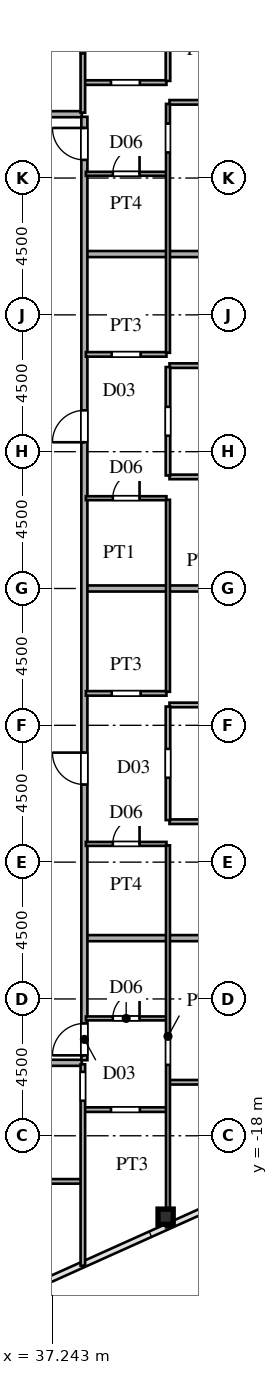
"""IFC4 building model, lengths in metres.
Left out: names, types, materials, properties, quantities, classifications, styles, units other than length and angle.
Written with IfcOpenShell. Run it as: python <this file> out.ifc"""

import sys

from ifc_helpers import new_model, si_unit, direction, frame, frame_2d, origin, origin_2d, place, context, subcontext, project, spatial, rectangle, hollow_rectangle, extrude, source, transform, mapped, element, fill, save


model = new_model("IFC4")
c1 = context("Model", 3, precision=1e-05, world=origin(), true_north=direction((0.0, 1.0)))
c2 = subcontext(c1, "Body", "Model", "MODEL_VIEW")
j1 = project(units=[si_unit("LENGTHUNIT", "METRE"), si_unit("PLANEANGLEUNIT", "RADIAN")], contexts=[c1])
p1 = place(None, origin())
s1 = spatial("IfcSite", under=j1, at=p1, CompositionType="ELEMENT")
p2 = place(p1, origin())
s2 = spatial("IfcBuilding", under=s1, at=p2, CompositionType="ELEMENT")
p3 = place(p2, frame((0.0, 0.0, 83.7)))
s3 = spatial("IfcBuildingStorey", under=s2, at=p3, CompositionType="ELEMENT", Elevation=83.7)
m1 = source(origin(), c2, "Body", "SweptSolid", [
    extrude(hollow_rectangle(XDim=0.5, YDim=0.5, WallThickness=0.02, at=origin_2d()), origin(), (0.0, 0.0, 1.0), 3.6),
])
p4 = place(p3, frame((40.973, -20.661, 0.0), z_axis=(0.0, 0.0, 1.0), x_axis=(1.0, 0.0, 0.0)))
e1 = element("IfcColumn", 1, at=p4, inside=s3, PredefinedType="COLUMN", context=c2, shape_type="MappedRepresentation", body=[
    mapped(m1, transform((0.0, 0.0, 0.0), scale=1.0)),
])
p5 = place(p3, frame((27.465, -19.5, 0.0), z_axis=(0.0, 0.0, 1.0), x_axis=(1.0, 0.0, 0.0)))
e2 = element("IfcWall", 2, at=p5, inside=s3, PredefinedType="PARTITIONING", context=c2, shape_type="SweptSolid", body=[
    extrude(rectangle(XDim=10.735, YDim=0.15, at=frame_2d((5.367, 0.0))), origin(), (0.0, 0.0, 1.0), 3.34),
])
p6 = place(p5, frame((4.935, 0.0, 0.0)))
e3 = element("IfcOpeningElement", 3, at=p6, cuts=e2, PredefinedType="OPENING", context=c2, shape_type="SweptSolid", body=[
    extrude(rectangle(XDim=0.95, YDim=2.15, at=frame_2d((0.475, 1.075))), frame((0.0, 0.085, 0.0), z_axis=(0.0, -1.0, 0.0), x_axis=(1.0, 0.0, 0.0)), (0.0, 0.0, 1.0), 0.17),
])
p7 = place(p3, frame((38.3, -17.14, 0.0), z_axis=(0.0, 0.0, 1.0), x_axis=(1.0, 0.0, 0.0)))
e4 = element("IfcWall", 4, at=p7, inside=s3, PredefinedType="PARTITIONING", context=c2, shape_type="SweptSolid", body=[
    extrude(rectangle(XDim=2.7, YDim=0.15, at=frame_2d((1.35, 0.0))), origin(), (0.0, 0.0, 1.0), 3.34),
])
p8 = place(p7, frame((0.875, 0.0, 0.0)))
e5 = element("IfcOpeningElement", 5, at=p8, cuts=e4, PredefinedType="OPENING", context=c2, shape_type="SweptSolid", body=[
    extrude(rectangle(XDim=0.95, YDim=2.15, at=frame_2d((0.475, 1.075))), frame((0.0, 0.085, 0.0), z_axis=(0.0, -1.0, 0.0), x_axis=(1.0, 0.0, 0.0)), (0.0, 0.0, 1.0), 0.17),
])
p9 = place(p3, frame((41.1, -16.24, 0.0), z_axis=(0.0, 0.0, 1.0), x_axis=(1.0, 0.0, 0.0)))
e6 = element("IfcWall", 6, at=p9, inside=s3, PredefinedType="PARTITIONING", context=c2, shape_type="SweptSolid", body=[
    extrude(rectangle(XDim=10.515, YDim=0.15, at=frame_2d((5.257, 0.0))), origin(), (0.0, 0.0, 1.0), 3.34),
])
p10 = place(p9, frame((2.837, 0.0, 0.0)))
e7 = element("IfcOpeningElement", 7, at=p10, cuts=e6, PredefinedType="OPENING", context=c2, shape_type="SweptSolid", body=[
    extrude(rectangle(XDim=0.95, YDim=2.15, at=frame_2d((0.475, 1.075))), frame((0.0, 0.085, 0.0), z_axis=(0.0, -1.0, 0.0), x_axis=(1.0, 0.0, 0.0)), (0.0, 0.0, 1.0), 0.17),
])
p11 = place(p3, frame((36.585, -15.6, 0.0), z_axis=(0.0, 0.0, 1.0), x_axis=(1.0, 0.0, 0.0)))
e8 = element("IfcWall", 8, at=p11, inside=s3, PredefinedType="PARTITIONING", context=c2, shape_type="SweptSolid", body=[
    extrude(rectangle(XDim=1.63, YDim=0.2, at=frame_2d((0.815, 0.0))), origin(), (0.0, 0.0, 1.0), 3.34),
])
p12 = place(p3, frame((38.35, -14.14, 0.0), z_axis=(0.0, 0.0, 1.0), x_axis=(1.0, 0.0, 0.0)))
e9 = element("IfcWall", 9, at=p12, inside=s3, PredefinedType="PARTITIONING", context=c2, shape_type="SweptSolid", body=[
    extrude(rectangle(XDim=2.65, YDim=0.13, at=frame_2d((1.325, 0.0))), origin(), (0.0, 0.0, 1.0), 3.34),
])
p13 = place(p12, frame((0.885, 0.0, 0.0)))
e10 = element("IfcOpeningElement", 10, at=p13, cuts=e9, PredefinedType="OPENING", context=c2, shape_type="SweptSolid", body=[
    extrude(rectangle(XDim=0.88, YDim=2.1, at=frame_2d((0.44, 1.05))), frame((0.0, 0.075, 0.0), z_axis=(0.0, -1.0, 0.0), x_axis=(1.0, 0.0, 0.0)), (0.0, 0.0, 1.0), 0.15),
])
p14 = place(p3, frame((38.38, -11.5, 0.0), z_axis=(0.0, 0.0, 1.0), x_axis=(1.0, 0.0, 0.0)))
e11 = element("IfcWall", 11, at=p14, inside=s3, PredefinedType="PARTITIONING", context=c2, shape_type="SweptSolid", body=[
    extrude(rectangle(XDim=23.743, YDim=0.2, at=frame_2d((11.872, 0.0))), origin(), (0.0, 0.0, 1.0), 3.34),
])
p15 = place(p3, frame((38.35, -8.4, 0.0), z_axis=(0.0, 0.0, 1.0), x_axis=(1.0, 0.0, 0.0)))
e12 = element("IfcWall", 12, at=p15, inside=s3, PredefinedType="PARTITIONING", context=c2, shape_type="SweptSolid", body=[
    extrude(rectangle(XDim=2.65, YDim=0.13, at=frame_2d((1.325, 0.0))), origin(), (0.0, 0.0, 1.0), 3.34),
])
p16 = place(p15, frame((0.885, 0.0, 0.0)))
e13 = element("IfcOpeningElement", 13, at=p16, cuts=e12, PredefinedType="OPENING", context=c2, shape_type="SweptSolid", body=[
    extrude(rectangle(XDim=0.88, YDim=2.1, at=frame_2d((0.44, 1.05))), frame((0.0, 0.075, 0.0), z_axis=(0.0, -1.0, 0.0), x_axis=(1.0, 0.0, 0.0)), (0.0, 0.0, 1.0), 0.15),
])
p17 = place(p3, frame((41.1, -7.67, 0.0), z_axis=(0.0, 0.0, 1.0), x_axis=(1.0, 0.0, 0.0)))
e14 = element("IfcWall", 14, at=p17, inside=s3, PredefinedType="PARTITIONING", context=c2, shape_type="SweptSolid", body=[
    extrude(rectangle(XDim=29.218, YDim=0.15, at=frame_2d((14.609, 0.0))), origin(), (0.0, 0.0, 1.0), 3.34),
])
p18 = place(p17, frame((6.2, 0.0, 0.0)))
e15 = element("IfcOpeningElement", 15, at=p18, cuts=e14, PredefinedType="OPENING", context=c2, shape_type="SweptSolid", body=[
    extrude(rectangle(XDim=0.95, YDim=2.15, at=frame_2d((0.475, 1.075))), frame((0.0, 0.085, 0.0), z_axis=(0.0, -1.0, 0.0), x_axis=(1.0, 0.0, 0.0)), (0.0, 0.0, 1.0), 0.17),
])
p19 = place(p17, frame((15.775, 0.0, 0.0)))
e16 = element("IfcOpeningElement", 16, at=p19, cuts=e14, PredefinedType="OPENING", context=c2, shape_type="SweptSolid", body=[
    extrude(rectangle(XDim=0.95, YDim=2.15, at=frame_2d((0.475, 1.075))), frame((0.0, 0.085, 0.0), z_axis=(0.0, -1.0, 0.0), x_axis=(1.0, 0.0, 0.0)), (0.0, 0.0, 1.0), 0.17),
])
p20 = place(p3, frame((41.1, -3.83, 0.0), z_axis=(0.0, 0.0, 1.0), x_axis=(1.0, 0.0, 0.0)))
e17 = element("IfcWall", 17, at=p20, inside=s3, PredefinedType="PARTITIONING", context=c2, shape_type="SweptSolid", body=[
    extrude(rectangle(XDim=29.935, YDim=0.15, at=frame_2d((14.967, 0.0))), origin(), (0.0, 0.0, 1.0), 3.34),
])
p21 = place(p20, frame((6.2, 0.0, 0.0)))
e18 = element("IfcOpeningElement", 18, at=p21, cuts=e17, PredefinedType="OPENING", context=c2, shape_type="SweptSolid", body=[
    extrude(rectangle(XDim=0.95, YDim=2.15, at=frame_2d((0.475, 1.075))), frame((0.0, 0.085, 0.0), z_axis=(0.0, -1.0, 0.0), x_axis=(1.0, 0.0, 0.0)), (0.0, 0.0, 1.0), 0.17),
])
p22 = place(p20, frame((15.775, 0.0, 0.0)))
e19 = element("IfcOpeningElement", 19, at=p22, cuts=e17, PredefinedType="OPENING", context=c2, shape_type="SweptSolid", body=[
    extrude(rectangle(XDim=0.95, YDim=2.15, at=frame_2d((0.475, 1.075))), frame((0.0, 0.085, 0.0), z_axis=(0.0, -1.0, 0.0), x_axis=(1.0, 0.0, 0.0)), (0.0, 0.0, 1.0), 0.17),
])
p23 = place(p3, frame((38.35, -3.45, 0.0), z_axis=(0.0, 0.0, 1.0), x_axis=(1.0, 0.0, 0.0)))
e20 = element("IfcWall", 20, at=p23, inside=s3, PredefinedType="PARTITIONING", context=c2, shape_type="SweptSolid", body=[
    extrude(rectangle(XDim=2.65, YDim=0.15, at=frame_2d((1.325, 0.0))), origin(), (0.0, 0.0, 1.0), 3.34),
])
p24 = place(p23, frame((0.85, 0.0, 0.0)))
e21 = element("IfcOpeningElement", 21, at=p24, cuts=e20, PredefinedType="OPENING", context=c2, shape_type="SweptSolid", body=[
    extrude(rectangle(XDim=0.95, YDim=2.15, at=frame_2d((0.475, 1.075))), frame((0.0, 0.085, 0.0), z_axis=(0.0, -1.0, 0.0), x_axis=(1.0, 0.0, 0.0)), (0.0, 0.0, 1.0), 0.17),
])
p25 = place(p3, frame((38.38, 0.0, 0.0), z_axis=(0.0, 0.0, 1.0), x_axis=(1.0, 0.0, 0.0)))
e22 = element("IfcWall", 22, at=p25, inside=s3, PredefinedType="PARTITIONING", context=c2, shape_type="SweptSolid", body=[
    extrude(rectangle(XDim=25.1, YDim=0.2, at=frame_2d((12.55, 0.0))), origin(), (0.0, 0.0, 1.0), 3.34),
])
p26 = place(p3, frame((38.35, 2.97, 0.0), z_axis=(0.0, 0.0, 1.0), x_axis=(1.0, 0.0, 0.0)))
e23 = element("IfcWall", 23, at=p26, inside=s3, PredefinedType="PARTITIONING", context=c2, shape_type="SweptSolid", body=[
    extrude(rectangle(XDim=2.65, YDim=0.13, at=frame_2d((1.325, 0.0))), origin(), (0.0, 0.0, 1.0), 3.34),
])
p27 = place(p26, frame((0.885, 0.0, 0.0)))
e24 = element("IfcOpeningElement", 24, at=p27, cuts=e23, PredefinedType="OPENING", context=c2, shape_type="SweptSolid", body=[
    extrude(rectangle(XDim=0.88, YDim=2.1, at=frame_2d((0.44, 1.05))), frame((0.0, 0.075, 0.0), z_axis=(0.0, -1.0, 0.0), x_axis=(1.0, 0.0, 0.0)), (0.0, 0.0, 1.0), 0.15),
])
p28 = place(p3, frame((41.1, 3.67, 0.0), z_axis=(0.0, 0.0, 1.0), x_axis=(1.0, 0.0, 0.0)))
e25 = element("IfcWall", 25, at=p28, inside=s3, PredefinedType="PARTITIONING", context=c2, shape_type="SweptSolid", body=[
    extrude(rectangle(XDim=29.935, YDim=0.15, at=frame_2d((14.967, 0.0))), origin(), (0.0, 0.0, 1.0), 3.34),
])
p29 = place(p28, frame((6.2, 0.0, 0.0)))
e26 = element("IfcOpeningElement", 26, at=p29, cuts=e25, PredefinedType="OPENING", context=c2, shape_type="SweptSolid", body=[
    extrude(rectangle(XDim=0.95, YDim=2.15, at=frame_2d((0.475, 1.075))), frame((0.0, 0.085, 0.0), z_axis=(0.0, -1.0, 0.0), x_axis=(1.0, 0.0, 0.0)), (0.0, 0.0, 1.0), 0.17),
])
p30 = place(p28, frame((15.775, 0.0, 0.0)))
e27 = element("IfcOpeningElement", 27, at=p30, cuts=e25, PredefinedType="OPENING", context=c2, shape_type="SweptSolid", body=[
    extrude(rectangle(XDim=0.95, YDim=2.15, at=frame_2d((0.475, 1.075))), frame((0.0, 0.085, 0.0), z_axis=(0.0, -1.0, 0.0), x_axis=(1.0, 0.0, 0.0)), (0.0, 0.0, 1.0), 0.17),
])
p31 = place(p3, frame((41.1, 7.33, 0.0), z_axis=(0.0, 0.0, 1.0), x_axis=(1.0, 0.0, 0.0)))
e28 = element("IfcWall", 28, at=p31, inside=s3, PredefinedType="PARTITIONING", context=c2, shape_type="SweptSolid", body=[
    extrude(rectangle(XDim=29.775, YDim=0.15, at=frame_2d((14.887, 0.0))), origin(), (0.0, 0.0, 1.0), 3.34),
])
p32 = place(p31, frame((6.2, 0.0, 0.0)))
e29 = element("IfcOpeningElement", 29, at=p32, cuts=e28, PredefinedType="OPENING", context=c2, shape_type="SweptSolid", body=[
    extrude(rectangle(XDim=0.95, YDim=2.15, at=frame_2d((0.475, 1.075))), frame((0.0, 0.085, 0.0), z_axis=(0.0, -1.0, 0.0), x_axis=(1.0, 0.0, 0.0)), (0.0, 0.0, 1.0), 0.17),
])
p33 = place(p31, frame((15.775, 0.0, 0.0)))
e30 = element("IfcOpeningElement", 30, at=p33, cuts=e28, PredefinedType="OPENING", context=c2, shape_type="SweptSolid", body=[
    extrude(rectangle(XDim=0.95, YDim=2.15, at=frame_2d((0.475, 1.075))), frame((0.0, 0.085, 0.0), z_axis=(0.0, -1.0, 0.0), x_axis=(1.0, 0.0, 0.0)), (0.0, 0.0, 1.0), 0.17),
])
p34 = place(p3, frame((38.35, 7.7, 0.0), z_axis=(0.0, 0.0, 1.0), x_axis=(1.0, 0.0, 0.0)))
e31 = element("IfcWall", 31, at=p34, inside=s3, PredefinedType="PARTITIONING", context=c2, shape_type="SweptSolid", body=[
    extrude(rectangle(XDim=2.65, YDim=0.15, at=frame_2d((1.325, 0.0))), origin(), (0.0, 0.0, 1.0), 3.34),
])
p35 = place(p34, frame((0.85, 0.0, 0.0)))
e32 = element("IfcOpeningElement", 32, at=p35, cuts=e31, PredefinedType="OPENING", context=c2, shape_type="SweptSolid", body=[
    extrude(rectangle(XDim=0.95, YDim=2.15, at=frame_2d((0.475, 1.075))), frame((0.0, 0.085, 0.0), z_axis=(0.0, -1.0, 0.0), x_axis=(1.0, 0.0, 0.0)), (0.0, 0.0, 1.0), 0.17),
])
p36 = place(p3, frame((38.38, 11.0, 0.0), z_axis=(0.0, 0.0, 1.0), x_axis=(1.0, 0.0, 0.0)))
e33 = element("IfcWall", 33, at=p36, inside=s3, PredefinedType="PARTITIONING", context=c2, shape_type="SweptSolid", body=[
    extrude(rectangle(XDim=24.854, YDim=0.2, at=frame_2d((12.427, 0.0))), origin(), (0.0, 0.0, 1.0), 3.34),
])
p37 = place(p3, frame((38.35, 13.64, 0.0), z_axis=(0.0, 0.0, 1.0), x_axis=(1.0, 0.0, 0.0)))
e34 = element("IfcWall", 34, at=p37, inside=s3, PredefinedType="PARTITIONING", context=c2, shape_type="SweptSolid", body=[
    extrude(rectangle(XDim=2.65, YDim=0.13, at=frame_2d((1.325, 0.0))), origin(), (0.0, 0.0, 1.0), 2.44),
])
p38 = place(p37, frame((0.885, 0.0, 0.0)))
e35 = element("IfcOpeningElement", 35, at=p38, cuts=e34, PredefinedType="OPENING", context=c2, shape_type="SweptSolid", body=[
    extrude(rectangle(XDim=0.88, YDim=2.1, at=frame_2d((0.44, 1.05))), frame((0.0, 0.075, 0.0), z_axis=(0.0, -1.0, 0.0), x_axis=(1.0, 0.0, 0.0)), (0.0, 0.0, 1.0), 0.15),
])
p39 = place(p3, frame((36.585, 15.6, 0.0), z_axis=(0.0, 0.0, 1.0), x_axis=(1.0, 0.0, 0.0)))
e36 = element("IfcWall", 36, at=p39, inside=s3, PredefinedType="PARTITIONING", context=c2, shape_type="SweptSolid", body=[
    extrude(rectangle(XDim=1.63, YDim=0.2, at=frame_2d((0.815, 0.0))), origin(), (0.0, 0.0, 1.0), 3.34),
])
p40 = place(p3, frame((41.1, 15.99, 0.0), z_axis=(0.0, 0.0, 1.0), x_axis=(1.0, 0.0, 0.0)))
e37 = element("IfcWall", 37, at=p40, inside=s3, PredefinedType="PARTITIONING", context=c2, shape_type="SweptSolid", body=[
    extrude(rectangle(XDim=11.071, YDim=0.15, at=frame_2d((5.535, 0.0))), origin(), (0.0, 0.0, 1.0), 3.34),
])
p41 = place(p40, frame((2.837, 0.0, 0.0)))
e38 = element("IfcOpeningElement", 38, at=p41, cuts=e37, PredefinedType="OPENING", context=c2, shape_type="SweptSolid", body=[
    extrude(rectangle(XDim=0.95, YDim=2.15, at=frame_2d((0.475, 1.075))), frame((0.0, 0.085, 0.0), z_axis=(0.0, -1.0, 0.0), x_axis=(1.0, 0.0, 0.0)), (0.0, 0.0, 1.0), 0.17),
])
p42 = place(p3, frame((38.3, 16.64, 0.0), z_axis=(0.0, 0.0, 1.0), x_axis=(1.0, 0.0, 0.0)))
e39 = element("IfcWall", 39, at=p42, inside=s3, PredefinedType="PARTITIONING", context=c2, shape_type="SweptSolid", body=[
    extrude(rectangle(XDim=2.7, YDim=0.15, at=frame_2d((1.35, 0.0))), origin(), (0.0, 0.0, 1.0), 3.34),
])
p43 = place(p42, frame((0.875, 0.0, 0.0)))
e40 = element("IfcOpeningElement", 40, at=p43, cuts=e39, PredefinedType="OPENING", context=c2, shape_type="SweptSolid", body=[
    extrude(rectangle(XDim=0.95, YDim=2.15, at=frame_2d((0.475, 1.075))), frame((0.0, 0.085, 0.0), z_axis=(0.0, -1.0, 0.0), x_axis=(1.0, 0.0, 0.0)), (0.0, 0.0, 1.0), 0.17),
])
p44 = place(p3, frame((38.25, -22.273, 0.0), z_axis=(0.0, 0.0, 1.0), x_axis=(0.0, 1.0, 0.0)))
e41 = element("IfcWall", 41, at=p44, inside=s3, PredefinedType="PARTITIONING", context=c2, shape_type="SweptSolid", body=[
    extrude(rectangle(XDim=6.623, YDim=0.15, at=frame_2d((3.312, 0.0))), origin(), (0.0, 0.0, 1.0), 3.34),
])
p45 = place(p44, frame((5.426, 0.0, 0.0)))
e42 = element("IfcOpeningElement", 42, at=p45, cuts=e41, PredefinedType="OPENING", context=c2, shape_type="SweptSolid", body=[
    extrude(rectangle(XDim=0.95, YDim=2.15, at=frame_2d((0.475, 1.075))), frame((0.0, 0.085, 0.0), z_axis=(0.0, -1.0, 0.0), x_axis=(1.0, 0.0, 0.0)), (0.0, 0.0, 1.0), 0.17),
])
p46 = place(p3, frame((38.25, 15.65, 0.0), z_axis=(0.0, 0.0, 1.0), x_axis=(0.0, 1.0, 0.0)))
e43 = element("IfcWall", 43, at=p46, inside=s3, PredefinedType="PARTITIONING", context=c2, shape_type="SweptSolid", body=[
    extrude(rectangle(XDim=6.623, YDim=0.15, at=frame_2d((3.312, 0.0))), origin(), (0.0, 0.0, 1.0), 3.34),
])
p47 = place(p46, frame((1.948, 0.0, 0.0)))
e44 = element("IfcOpeningElement", 44, at=p47, cuts=e43, PredefinedType="OPENING", context=c2, shape_type="SweptSolid", body=[
    extrude(rectangle(XDim=0.95, YDim=2.15, at=frame_2d((0.475, 1.075))), frame((0.0, 0.085, 0.0), z_axis=(0.0, -1.0, 0.0), x_axis=(1.0, 0.0, 0.0)), (0.0, 0.0, 1.0), 0.17),
])
p48 = place(p3, frame((38.3, -15.515, 0.0), z_axis=(0.0, 0.0, 1.0), x_axis=(0.0, 1.0, 0.0)))
e45 = element("IfcWall", 45, at=p48, inside=s3, PredefinedType="PARTITIONING", context=c2, shape_type="SweptSolid", body=[
    extrude(rectangle(XDim=31.03, YDim=0.2, at=frame_2d((15.515, 0.0))), origin(), (0.0, 0.0, 1.0), 3.34),
])
p49 = place(p48, frame((0.16, 0.0, 0.0)))
e46 = element("IfcOpeningElement", 46, at=p49, cuts=e45, PredefinedType="OPENING", context=c2, shape_type="SweptSolid", body=[
    extrude(rectangle(XDim=1.05, YDim=2.25, at=frame_2d((0.525, 1.125))), frame((0.0, 0.11, 0.0), z_axis=(0.0, -1.0, 0.0), x_axis=(1.0, 0.0, 0.0)), (0.0, 0.0, 1.0), 0.22),
])
p50 = place(p48, frame((9.067, 0.0, 0.0)))
e47 = element("IfcOpeningElement", 47, at=p50, cuts=e45, PredefinedType="OPENING", context=c2, shape_type="SweptSolid", body=[
    extrude(rectangle(XDim=1.05, YDim=2.25, at=frame_2d((0.525, 1.125))), frame((0.0, 0.11, 0.0), z_axis=(0.0, -1.0, 0.0), x_axis=(1.0, 0.0, 0.0)), (0.0, 0.0, 1.0), 0.22),
])
p51 = place(p48, frame((20.325, 0.0, 0.0)))
e48 = element("IfcOpeningElement", 48, at=p51, cuts=e45, PredefinedType="OPENING", context=c2, shape_type="SweptSolid", body=[
    extrude(rectangle(XDim=1.05, YDim=2.25, at=frame_2d((0.525, 1.125))), frame((0.0, 0.11, 0.0), z_axis=(0.0, -1.0, 0.0), x_axis=(1.0, 0.0, 0.0)), (0.0, 0.0, 1.0), 0.22),
])
p52 = place(p48, frame((29.613, 0.0, 0.0)))
e49 = element("IfcOpeningElement", 49, at=p52, cuts=e45, PredefinedType="OPENING", context=c2, shape_type="SweptSolid", body=[
    extrude(rectangle(XDim=1.05, YDim=2.25, at=frame_2d((0.525, 1.125))), frame((0.0, 0.11, 0.0), z_axis=(0.0, -1.0, 0.0), x_axis=(1.0, 0.0, 0.0)), (0.0, 0.0, 1.0), 0.22),
])
p53 = place(p3, frame((41.05, -21.012, 0.0), z_axis=(0.0, 0.0, 1.0), x_axis=(0.0, 1.0, 0.0)))
e50 = element("IfcWall", 50, at=p53, inside=s3, PredefinedType="PARTITIONING", context=c2, shape_type="SweptSolid", body=[
    extrude(rectangle(XDim=12.565, YDim=0.13, at=frame_2d((6.282, 0.0))), origin(), (0.0, 0.0, 1.0), 2.94),
])
p54 = place(p53, frame((5.345, 0.0, 0.0)))
e51 = element("IfcOpeningElement", 51, at=p54, cuts=e50, PredefinedType="OPENING", context=c2, shape_type="SweptSolid", body=[
    extrude(rectangle(XDim=0.95, YDim=2.15, at=frame_2d((0.475, 1.075))), frame((0.0, 0.075, 0.0), z_axis=(0.0, -1.0, 0.0), x_axis=(1.0, 0.0, 0.0)), (0.0, 0.0, 1.0), 0.15),
])
p55 = place(p3, frame((41.05, -7.617, 0.0), z_axis=(0.0, 0.0, 1.0), x_axis=(0.0, 1.0, 0.0)))
e52 = element("IfcWall", 52, at=p55, inside=s3, PredefinedType="PARTITIONING", context=c2, shape_type="SweptSolid", body=[
    extrude(rectangle(XDim=3.734, YDim=0.15, at=frame_2d((1.867, 0.0))), origin(), (0.0, 0.0, 1.0), 2.94),
])
p56 = place(p55, frame((1.392, 0.0, 0.0)))
e53 = element("IfcOpeningElement", 53, at=p56, cuts=e52, PredefinedType="OPENING", context=c2, shape_type="SweptSolid", body=[
    extrude(rectangle(XDim=0.95, YDim=2.15, at=frame_2d((0.475, 1.075))), frame((0.0, 0.085, 0.0), z_axis=(0.0, -1.0, 0.0), x_axis=(1.0, 0.0, 0.0)), (0.0, 0.0, 1.0), 0.17),
])
p57 = place(p3, frame((41.05, -3.398, 0.0), z_axis=(0.0, 0.0, 1.0), x_axis=(0.0, 1.0, 0.0)))
e54 = element("IfcWall", 54, at=p57, inside=s3, PredefinedType="PARTITIONING", context=c2, shape_type="SweptSolid", body=[
    extrude(rectangle(XDim=6.316, YDim=0.13, at=frame_2d((3.158, 0.0))), origin(), (0.0, 0.0, 1.0), 2.94),
])
p58 = place(p3, frame((41.05, 3.717, 0.0), z_axis=(0.0, 0.0, 1.0), x_axis=(0.0, 1.0, 0.0)))
e55 = element("IfcWall", 55, at=p58, inside=s3, PredefinedType="PARTITIONING", context=c2, shape_type="SweptSolid", body=[
    extrude(rectangle(XDim=3.566, YDim=0.15, at=frame_2d((1.783, 0.0))), origin(), (0.0, 0.0, 1.0), 2.94),
])
p59 = place(p58, frame((1.308, 0.0, 0.0)))
e56 = element("IfcOpeningElement", 56, at=p59, cuts=e55, PredefinedType="OPENING", context=c2, shape_type="SweptSolid", body=[
    extrude(rectangle(XDim=0.95, YDim=2.15, at=frame_2d((0.475, 1.075))), frame((0.0, 0.085, 0.0), z_axis=(0.0, -1.0, 0.0), x_axis=(1.0, 0.0, 0.0)), (0.0, 0.0, 1.0), 0.17),
])
p60 = place(p3, frame((41.05, 7.752, 0.0), z_axis=(0.0, 0.0, 1.0), x_axis=(0.0, 1.0, 0.0)))
e57 = element("IfcWall", 57, at=p60, inside=s3, PredefinedType="PARTITIONING", context=c2, shape_type="SweptSolid", body=[
    extrude(rectangle(XDim=8.187, YDim=0.13, at=frame_2d((4.094, 0.0))), origin(), (0.0, 0.0, 1.0), 2.94),
])
p61 = place(p60, frame((6.59, 0.0, 0.0)))
e58 = element("IfcOpeningElement", 58, at=p61, cuts=e57, PredefinedType="OPENING", context=c2, shape_type="SweptSolid", body=[
    extrude(rectangle(XDim=0.95, YDim=2.15, at=frame_2d((0.475, 1.075))), frame((0.0, 0.075, 0.0), z_axis=(0.0, -1.0, 0.0), x_axis=(1.0, 0.0, 0.0)), (0.0, 0.0, 1.0), 0.15),
])
p62 = place(p3, frame((41.05, 16.695, 0.0), z_axis=(0.0, 0.0, 1.0), x_axis=(0.0, 1.0, 0.0)))
e59 = element("IfcWall", 59, at=p62, inside=s3, PredefinedType="PARTITIONING", context=c2, shape_type="SweptSolid", body=[
    extrude(rectangle(XDim=4.317, YDim=0.15, at=frame_2d((2.158, 0.0))), origin(), (0.0, 0.0, 1.0), 3.34),
])
m2 = source(origin(), c2, "Body", "SweptSolid", [
    extrude(rectangle(XDim=0.88, YDim=2.1, at=frame_2d((0.44, 1.05))), frame((0.0, 0.025, 0.0), z_axis=(0.0, -1.0, 0.0), x_axis=(1.0, 0.0, 0.0)), (0.0, 0.0, 1.0), 0.05),
])
p63 = place(p13, origin())
e60 = element("IfcDoor", 60, at=p63, inside=s3, OperationType="SINGLE_SWING_RIGHT", PredefinedType="DOOR", context=c2, shape_type="MappedRepresentation", body=[
    mapped(m2, transform((0.0, 0.0, 0.0), scale=1.0)),
])
fill(e10, e60)
p64 = place(p16, origin())
e61 = element("IfcDoor", 61, at=p64, inside=s3, OperationType="SINGLE_SWING_RIGHT", PredefinedType="DOOR", context=c2, shape_type="MappedRepresentation", body=[
    mapped(m2, transform((0.0, 0.0, 0.0), scale=1.0)),
])
fill(e13, e61)
p65 = place(p27, origin())
e62 = element("IfcDoor", 62, at=p65, inside=s3, OperationType="SINGLE_SWING_RIGHT", PredefinedType="DOOR", context=c2, shape_type="MappedRepresentation", body=[
    mapped(m2, transform((0.0, 0.0, 0.0), scale=1.0)),
])
fill(e24, e62)
p66 = place(p38, origin())
e63 = element("IfcDoor", 63, at=p66, inside=s3, OperationType="SINGLE_SWING_RIGHT", PredefinedType="DOOR", context=c2, shape_type="MappedRepresentation", body=[
    mapped(m2, transform((0.0, 0.0, 0.0), scale=1.0)),
])
fill(e35, e63)
m3 = source(origin(), c2, "Body", "SweptSolid", [
    extrude(rectangle(XDim=1.05, YDim=2.25, at=frame_2d((0.525, 1.125))), frame((0.0, 0.025, 0.0), z_axis=(0.0, -1.0, 0.0), x_axis=(1.0, 0.0, 0.0)), (0.0, 0.0, 1.0), 0.05),
])
p67 = place(p49, origin())
e64 = element("IfcDoor", 64, at=p67, inside=s3, OperationType="SINGLE_SWING_LEFT", PredefinedType="DOOR", context=c2, shape_type="MappedRepresentation", body=[
    mapped(m3, transform((0.0, 0.0, 0.0), scale=1.0)),
])
fill(e46, e64)
p68 = place(p50, origin())
e65 = element("IfcDoor", 65, at=p68, inside=s3, OperationType="SINGLE_SWING_RIGHT", PredefinedType="DOOR", context=c2, shape_type="MappedRepresentation", body=[
    mapped(m3, transform((0.0, 0.0, 0.0), scale=1.0)),
])
fill(e47, e65)
p69 = place(p51, origin())
e66 = element("IfcDoor", 66, at=p69, inside=s3, OperationType="SINGLE_SWING_LEFT", PredefinedType="DOOR", context=c2, shape_type="MappedRepresentation", body=[
    mapped(m3, transform((0.0, 0.0, 0.0), scale=1.0)),
])
fill(e48, e66)
p70 = place(p52, origin())
e67 = element("IfcDoor", 67, at=p70, inside=s3, OperationType="SINGLE_SWING_RIGHT", PredefinedType="DOOR", context=c2, shape_type="MappedRepresentation", body=[
    mapped(m3, transform((0.0, 0.0, 0.0), scale=1.0)),
])
fill(e49, e67)
save(model, sys.argv[1])
